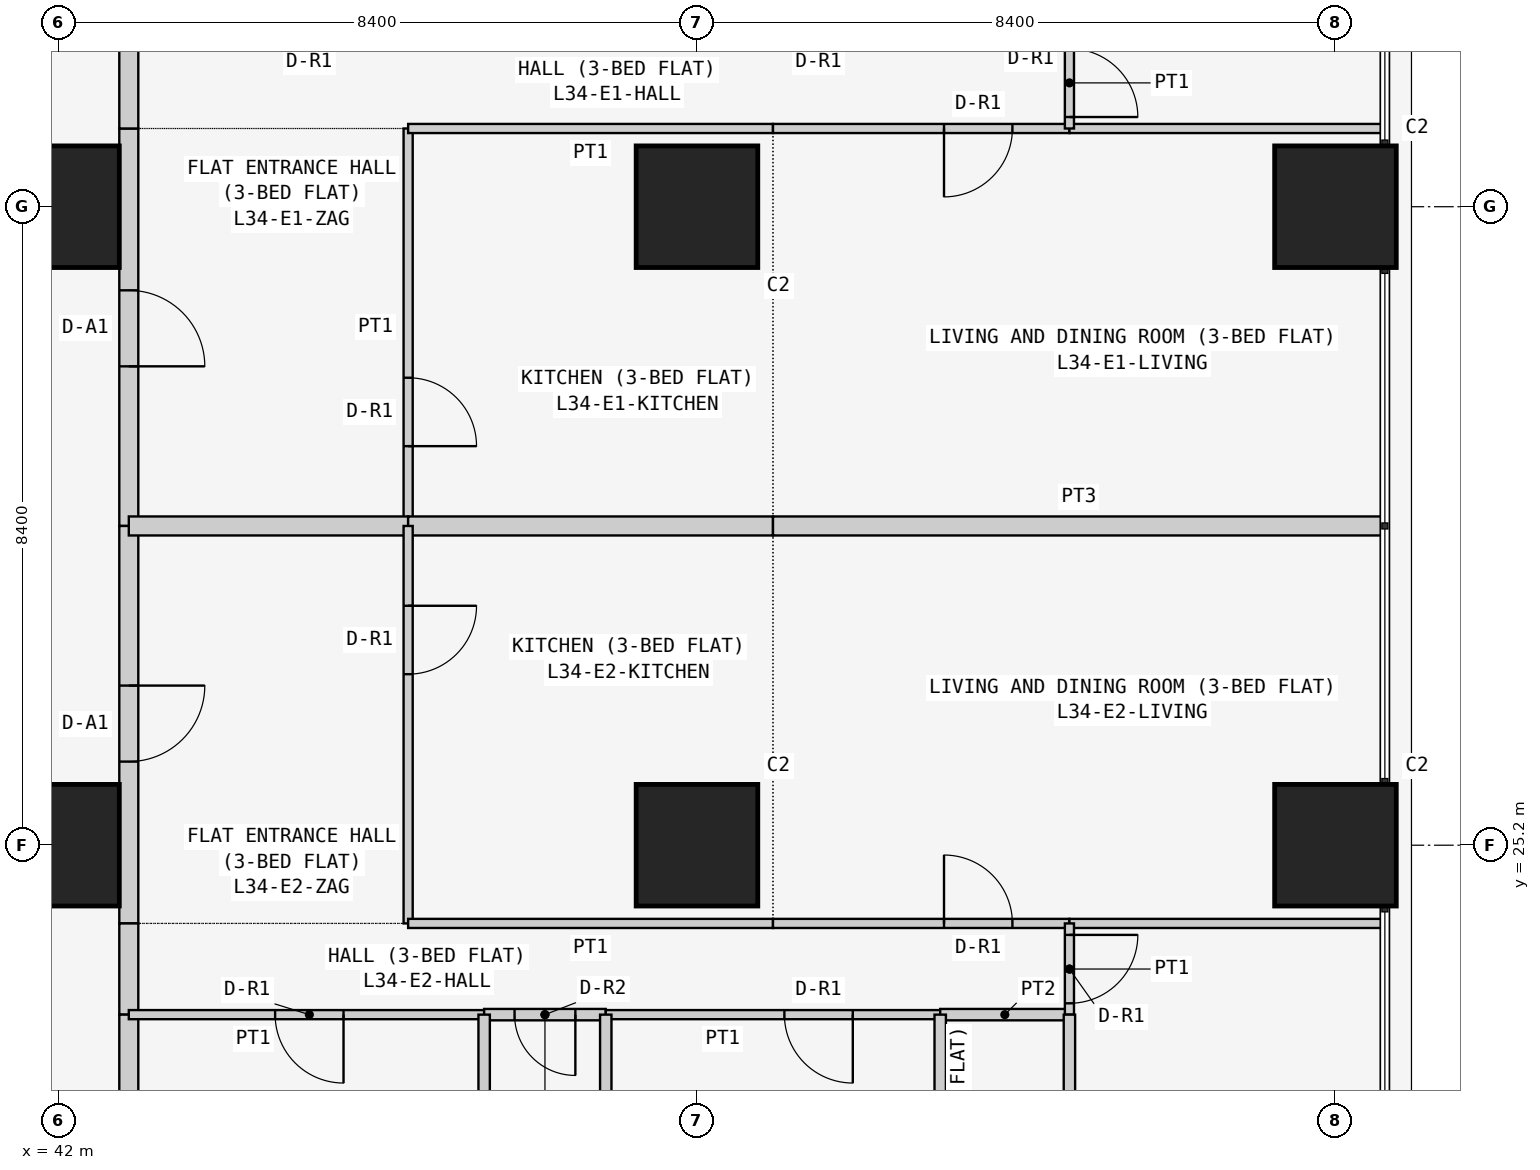
"""IFC4 building model, lengths in metres.
Left out: names, types, materials, properties, quantities, classifications, styles, units other than length and angle.
Written with IfcOpenShell. Run it as: python <this file> out.ifc"""

import sys

from ifc_helpers import new_model, si_unit, direction, frame, frame_2d, origin, origin_2d, place, context, subcontext, project, spatial, rectangle, extrude, element, fill, save


model = new_model("IFC4")
c1 = context("Model", 3, precision=1e-05, world=origin(), true_north=direction((0.0, 1.0)))
c2 = subcontext(c1, "Body", "Model", "MODEL_VIEW")
j1 = project(units=[si_unit("LENGTHUNIT", "METRE"), si_unit("PLANEANGLEUNIT", "RADIAN")], contexts=[c1])
p1 = place(None, origin())
s1 = spatial("IfcSite", under=j1, at=p1, CompositionType="ELEMENT")
p2 = place(p1, origin())
s2 = spatial("IfcBuilding", under=s1, at=p2, CompositionType="ELEMENT")
p3 = place(p2, frame((0.0, 0.0, 134.1)))
s3 = spatial("IfcBuildingStorey", under=s2, at=p3, CompositionType="ELEMENT", Elevation=134.1)
for number, where, z_axis, x_axis in (
    (1, (42.0, 25.2, 0.0), (0.0, 0.0, 1.0), (1.0, 0.0, 0.0)),
    (2, (42.0, 33.6, 0.0), (0.0, 0.0, 1.0), (1.0, 0.0, 0.0)),
    (3, (50.4, 25.2, 0.0), (0.0, 0.0, 1.0), (1.0, 0.0, 0.0)),
    (4, (50.4, 33.6, 0.0), (0.0, 0.0, 1.0), (1.0, 0.0, 0.0)),
    (5, (58.8, 25.2, 0.0), (0.0, 0.0, 1.0), (1.0, 0.0, 0.0)),
    (6, (58.8, 33.6, 0.0), (0.0, 0.0, 1.0), (1.0, 0.0, 0.0)),
):
    element("IfcColumn", number, at=place(p3, frame(where, z_axis=z_axis, x_axis=x_axis)), inside=s3, PredefinedType="COLUMN", context=c2, shape_type="SweptSolid", body=[
        extrude(rectangle(XDim=1.6, YDim=1.6, at=origin_2d()), origin(), (0.0, 0.0, 1.0), 3.6),
    ])
p4 = place(p3, frame((42.925, 34.629, 0.0), z_axis=(0.0, 0.0, 1.0), x_axis=(0.0, -1.0, 0.0)))
e7 = element("IfcWall", 7, at=p4, inside=s3, PredefinedType="PARTITIONING", context=c2, shape_type="SweptSolid", body=[
    extrude(rectangle(XDim=5.229, YDim=0.25, at=frame_2d((2.615, 0.0))), origin(), (0.0, 0.0, 1.0), 3.45),
])
p5 = place(p4, frame((2.129, 0.0, 0.0)))
e8 = element("IfcOpeningElement", 8, at=p5, cuts=e7, PredefinedType="OPENING", context=c2, shape_type="SweptSolid", body=[
    extrude(rectangle(XDim=1.0, YDim=2.1, at=frame_2d((0.5, 1.05))), frame((0.0, 0.135, 0.0), z_axis=(0.0, -1.0, 0.0), x_axis=(1.0, 0.0, 0.0)), (0.0, 0.0, 1.0), 0.27),
])
p6 = place(p3, frame((42.925, 35.829, 0.0), z_axis=(0.0, 0.0, 1.0), x_axis=(0.0, -1.0, 0.0)))
e9 = element("IfcWall", 9, at=p6, inside=s3, PredefinedType="PARTITIONING", context=c2, shape_type="SweptSolid", body=[
    extrude(rectangle(XDim=1.2, YDim=0.25, at=frame_2d((0.6, 0.0))), origin(), (0.0, 0.0, 1.0), 3.45),
])
p7 = place(p3, frame((42.925, 29.4, 0.0), z_axis=(0.0, 0.0, 1.0), x_axis=(0.0, -1.0, 0.0)))
e10 = element("IfcWall", 10, at=p7, inside=s3, PredefinedType="PARTITIONING", context=c2, shape_type="SweptSolid", body=[
    extrude(rectangle(XDim=5.229, YDim=0.25, at=frame_2d((2.615, 0.0))), origin(), (0.0, 0.0, 1.0), 3.45),
])
p8 = place(p7, frame((2.1, 0.0, 0.0)))
e11 = element("IfcOpeningElement", 11, at=p8, cuts=e10, PredefinedType="OPENING", context=c2, shape_type="SweptSolid", body=[
    extrude(rectangle(XDim=1.0, YDim=2.1, at=frame_2d((0.5, 1.05))), frame((0.0, 0.135, 0.0), z_axis=(0.0, -1.0, 0.0), x_axis=(1.0, 0.0, 0.0)), (0.0, 0.0, 1.0), 0.27),
])
p9 = place(p3, frame((42.925, 24.171, 0.0), z_axis=(0.0, 0.0, 1.0), x_axis=(0.0, -1.0, 0.0)))
e12 = element("IfcWall", 12, at=p9, inside=s3, PredefinedType="PARTITIONING", context=c2, shape_type="SweptSolid", body=[
    extrude(rectangle(XDim=1.2, YDim=0.25, at=frame_2d((0.6, 0.0))), origin(), (0.0, 0.0, 1.0), 3.45),
])
p10 = place(p3, frame((42.925, 22.971, 0.0), z_axis=(0.0, 0.0, 1.0), x_axis=(0.0, -1.0, 0.0)))
e13 = element("IfcWall", 13, at=p10, inside=s3, PredefinedType="PARTITIONING", context=c2, shape_type="SweptSolid", body=[
    extrude(rectangle(XDim=6.871, YDim=0.25, at=frame_2d((3.436, 0.0))), origin(), (0.0, 0.0, 1.0), 3.45),
])
p11 = place(p3, frame((46.6, 29.4, 0.0), z_axis=(0.0, 0.0, 1.0), x_axis=(0.0, 1.0, 0.0)))
e14 = element("IfcWall", 14, at=p11, inside=s3, PredefinedType="PARTITIONING", context=c2, shape_type="SweptSolid", body=[
    extrude(rectangle(XDim=5.229, YDim=0.12, at=frame_2d((2.615, 0.0))), origin(), (0.0, 0.0, 1.0), 3.45),
])
p12 = place(p11, frame((1.05, 0.0, 0.0)))
e15 = element("IfcOpeningElement", 15, at=p12, cuts=e14, PredefinedType="OPENING", context=c2, shape_type="SweptSolid", body=[
    extrude(rectangle(XDim=0.9, YDim=2.1, at=frame_2d((0.45, 1.05))), frame((0.0, 0.07, 0.0), z_axis=(0.0, -1.0, 0.0), x_axis=(1.0, 0.0, 0.0)), (0.0, 0.0, 1.0), 0.14),
])
p13 = place(p3, frame((42.925, 29.4, 0.0), z_axis=(0.0, 0.0, 1.0), x_axis=(1.0, 0.0, 0.0)))
e16 = element("IfcWall", 16, at=p13, inside=s3, PredefinedType="PARTITIONING", context=c2, shape_type="SweptSolid", body=[
    extrude(rectangle(XDim=3.675, YDim=0.25, at=frame_2d((1.837, 0.0))), origin(), (0.0, 0.0, 1.0), 3.45),
])
p14 = place(p3, frame((51.4, 34.629, 0.0), z_axis=(0.0, 0.0, 1.0), x_axis=(-1.0, 0.0, 0.0)))
e17 = element("IfcWall", 17, at=p14, inside=s3, PredefinedType="PARTITIONING", context=c2, shape_type="SweptSolid", body=[
    extrude(rectangle(XDim=4.8, YDim=0.12, at=frame_2d((2.4, 0.0))), origin(), (0.0, 0.0, 1.0), 3.45),
])
p15 = place(p3, frame((46.6, 29.4, 0.0), z_axis=(0.0, 0.0, 1.0), x_axis=(1.0, 0.0, 0.0)))
e18 = element("IfcWall", 18, at=p15, inside=s3, PredefinedType="PARTITIONING", context=c2, shape_type="SweptSolid", body=[
    extrude(rectangle(XDim=4.8, YDim=0.25, at=frame_2d((2.4, 0.0))), origin(), (0.0, 0.0, 1.0), 3.45),
])
p16 = place(p3, frame((55.3, 34.629, 0.0), z_axis=(0.0, 0.0, 1.0), x_axis=(-1.0, 0.0, 0.0)))
e19 = element("IfcWall", 19, at=p16, inside=s3, PredefinedType="PARTITIONING", context=c2, shape_type="SweptSolid", body=[
    extrude(rectangle(XDim=3.9, YDim=0.12, at=frame_2d((1.95, 0.0))), origin(), (0.0, 0.0, 1.0), 3.45),
])
p17 = place(p16, frame((0.75, 0.0, 0.0)))
e20 = element("IfcOpeningElement", 20, at=p17, cuts=e19, PredefinedType="OPENING", context=c2, shape_type="SweptSolid", body=[
    extrude(rectangle(XDim=0.9, YDim=2.1, at=frame_2d((0.45, 1.05))), frame((0.0, 0.07, 0.0), z_axis=(0.0, -1.0, 0.0), x_axis=(1.0, 0.0, 0.0)), (0.0, 0.0, 1.0), 0.14),
])
p18 = place(p3, frame((59.45, 34.629, 0.0), z_axis=(0.0, 0.0, 1.0), x_axis=(-1.0, 0.0, 0.0)))
e21 = element("IfcWall", 21, at=p18, inside=s3, PredefinedType="PARTITIONING", context=c2, shape_type="SweptSolid", body=[
    extrude(rectangle(XDim=4.15, YDim=0.12, at=frame_2d((2.075, 0.0))), origin(), (0.0, 0.0, 1.0), 3.45),
])
p19 = place(p3, frame((51.4, 29.4, 0.0), z_axis=(0.0, 0.0, 1.0), x_axis=(1.0, 0.0, 0.0)))
e22 = element("IfcWall", 22, at=p19, inside=s3, PredefinedType="PARTITIONING", context=c2, shape_type="SweptSolid", body=[
    extrude(rectangle(XDim=8.05, YDim=0.25, at=frame_2d((4.025, 0.0))), origin(), (0.0, 0.0, 1.0), 3.45),
])
p20 = place(p3, frame((55.3, 34.629, 0.0), z_axis=(0.0, 0.0, 1.0), x_axis=(0.0, 1.0, 0.0)))
e23 = element("IfcWall", 23, at=p20, inside=s3, PredefinedType="PARTITIONING", context=c2, shape_type="SweptSolid", body=[
    extrude(rectangle(XDim=1.2, YDim=0.12, at=frame_2d((0.6, 0.0))), origin(), (0.0, 0.0, 1.0), 3.45),
])
p21 = place(p20, frame((0.151, 0.0, 0.0)))
e24 = element("IfcOpeningElement", 24, at=p21, cuts=e23, PredefinedType="OPENING", context=c2, shape_type="SweptSolid", body=[
    extrude(rectangle(XDim=0.9, YDim=2.1, at=frame_2d((0.45, 1.05))), frame((0.0, 0.07, 0.0), z_axis=(0.0, -1.0, 0.0), x_axis=(1.0, 0.0, 0.0)), (0.0, 0.0, 1.0), 0.14),
])
p22 = place(p3, frame((46.6, 29.4, 0.0), z_axis=(0.0, 0.0, 1.0), x_axis=(0.0, -1.0, 0.0)))
e25 = element("IfcWall", 25, at=p22, inside=s3, PredefinedType="PARTITIONING", context=c2, shape_type="SweptSolid", body=[
    extrude(rectangle(XDim=5.229, YDim=0.12, at=frame_2d((2.615, 0.0))), origin(), (0.0, 0.0, 1.0), 3.45),
])
p23 = place(p22, frame((1.05, 0.0, 0.0)))
e26 = element("IfcOpeningElement", 26, at=p23, cuts=e25, PredefinedType="OPENING", context=c2, shape_type="SweptSolid", body=[
    extrude(rectangle(XDim=0.9, YDim=2.1, at=frame_2d((0.45, 1.05))), frame((0.0, 0.07, 0.0), z_axis=(0.0, -1.0, 0.0), x_axis=(1.0, 0.0, 0.0)), (0.0, 0.0, 1.0), 0.14),
])
p24 = place(p3, frame((51.4, 24.171, 0.0), z_axis=(0.0, 0.0, 1.0), x_axis=(-1.0, 0.0, 0.0)))
e27 = element("IfcWall", 27, at=p24, inside=s3, PredefinedType="PARTITIONING", context=c2, shape_type="SweptSolid", body=[
    extrude(rectangle(XDim=4.8, YDim=0.12, at=frame_2d((2.4, 0.0))), origin(), (0.0, 0.0, 1.0), 3.45),
])
p25 = place(p3, frame((55.3, 24.171, 0.0), z_axis=(0.0, 0.0, 1.0), x_axis=(-1.0, 0.0, 0.0)))
e28 = element("IfcWall", 28, at=p25, inside=s3, PredefinedType="PARTITIONING", context=c2, shape_type="SweptSolid", body=[
    extrude(rectangle(XDim=3.9, YDim=0.12, at=frame_2d((1.95, 0.0))), origin(), (0.0, 0.0, 1.0), 3.45),
])
p26 = place(p25, frame((0.75, 0.0, 0.0)))
e29 = element("IfcOpeningElement", 29, at=p26, cuts=e28, PredefinedType="OPENING", context=c2, shape_type="SweptSolid", body=[
    extrude(rectangle(XDim=0.9, YDim=2.1, at=frame_2d((0.45, 1.05))), frame((0.0, 0.07, 0.0), z_axis=(0.0, -1.0, 0.0), x_axis=(1.0, 0.0, 0.0)), (0.0, 0.0, 1.0), 0.14),
])
p27 = place(p3, frame((59.45, 24.171, 0.0), z_axis=(0.0, 0.0, 1.0), x_axis=(-1.0, 0.0, 0.0)))
e30 = element("IfcWall", 30, at=p27, inside=s3, PredefinedType="PARTITIONING", context=c2, shape_type="SweptSolid", body=[
    extrude(rectangle(XDim=4.15, YDim=0.12, at=frame_2d((2.075, 0.0))), origin(), (0.0, 0.0, 1.0), 3.45),
])
p28 = place(p3, frame((47.6, 22.971, 0.0), z_axis=(0.0, 0.0, 1.0), x_axis=(-1.0, 0.0, 0.0)))
e31 = element("IfcWall", 31, at=p28, inside=s3, PredefinedType="PARTITIONING", context=c2, shape_type="SweptSolid", body=[
    extrude(rectangle(XDim=4.675, YDim=0.12, at=frame_2d((2.337, 0.0))), origin(), (0.0, 0.0, 1.0), 3.45),
])
p29 = place(p28, frame((1.85, 0.0, 0.0)))
e32 = element("IfcOpeningElement", 32, at=p29, cuts=e31, PredefinedType="OPENING", context=c2, shape_type="SweptSolid", body=[
    extrude(rectangle(XDim=0.9, YDim=2.1, at=frame_2d((0.45, 1.05))), frame((0.0, 0.07, 0.0), z_axis=(0.0, -1.0, 0.0), x_axis=(1.0, 0.0, 0.0)), (0.0, 0.0, 1.0), 0.14),
])
p30 = place(p3, frame((49.2, 22.971, 0.0), z_axis=(0.0, 0.0, 1.0), x_axis=(-1.0, 0.0, 0.0)))
e33 = element("IfcWall", 33, at=p30, inside=s3, PredefinedType="PARTITIONING", context=c2, shape_type="SweptSolid", body=[
    extrude(rectangle(XDim=1.6, YDim=0.15, at=frame_2d((0.8, 0.0))), origin(), (0.0, 0.0, 1.0), 3.45),
])
p31 = place(p30, frame((0.4, 0.0, 0.0)))
e34 = element("IfcOpeningElement", 34, at=p31, cuts=e33, PredefinedType="OPENING", context=c2, shape_type="SweptSolid", body=[
    extrude(rectangle(XDim=0.8, YDim=2.1, at=frame_2d((0.4, 1.05))), frame((0.0, 0.085, 0.0), z_axis=(0.0, -1.0, 0.0), x_axis=(1.0, 0.0, 0.0)), (0.0, 0.0, 1.0), 0.17),
])
p32 = place(p3, frame((53.6, 22.971, 0.0), z_axis=(0.0, 0.0, 1.0), x_axis=(-1.0, 0.0, 0.0)))
e35 = element("IfcWall", 35, at=p32, inside=s3, PredefinedType="PARTITIONING", context=c2, shape_type="SweptSolid", body=[
    extrude(rectangle(XDim=4.4, YDim=0.12, at=frame_2d((2.2, 0.0))), origin(), (0.0, 0.0, 1.0), 3.45),
])
p33 = place(p32, frame((1.15, 0.0, 0.0)))
e36 = element("IfcOpeningElement", 36, at=p33, cuts=e35, PredefinedType="OPENING", context=c2, shape_type="SweptSolid", body=[
    extrude(rectangle(XDim=0.9, YDim=2.1, at=frame_2d((0.45, 1.05))), frame((0.0, 0.07, 0.0), z_axis=(0.0, -1.0, 0.0), x_axis=(1.0, 0.0, 0.0)), (0.0, 0.0, 1.0), 0.14),
])
p34 = place(p3, frame((55.3, 22.971, 0.0), z_axis=(0.0, 0.0, 1.0), x_axis=(-1.0, 0.0, 0.0)))
e37 = element("IfcWall", 37, at=p34, inside=s3, PredefinedType="PARTITIONING", context=c2, shape_type="SweptSolid", body=[
    extrude(rectangle(XDim=1.7, YDim=0.15, at=frame_2d((0.85, 0.0))), origin(), (0.0, 0.0, 1.0), 3.45),
])
p35 = place(p3, frame((55.3, 24.171, 0.0), z_axis=(0.0, 0.0, 1.0), x_axis=(0.0, -1.0, 0.0)))
e38 = element("IfcWall", 38, at=p35, inside=s3, PredefinedType="PARTITIONING", context=c2, shape_type="SweptSolid", body=[
    extrude(rectangle(XDim=1.2, YDim=0.12, at=frame_2d((0.6, 0.0))), origin(), (0.0, 0.0, 1.0), 3.45),
])
p36 = place(p35, frame((0.151, 0.0, 0.0)))
e39 = element("IfcOpeningElement", 39, at=p36, cuts=e38, PredefinedType="OPENING", context=c2, shape_type="SweptSolid", body=[
    extrude(rectangle(XDim=0.9, YDim=2.1, at=frame_2d((0.45, 1.05))), frame((0.0, 0.07, 0.0), z_axis=(0.0, -1.0, 0.0), x_axis=(1.0, 0.0, 0.0)), (0.0, 0.0, 1.0), 0.14),
])
for number, where, z_axis, x_axis in (
    (40, (47.6, 22.971, 0.0), (0.0, 0.0, 1.0), (0.0, -1.0, 0.0)),
    (41, (49.2, 22.971, 0.0), (0.0, 0.0, 1.0), (0.0, -1.0, 0.0)),
    (42, (53.6, 22.971, 0.0), (0.0, 0.0, 1.0), (0.0, -1.0, 0.0)),
):
    element("IfcWall", number, at=place(p3, frame(where, z_axis=z_axis, x_axis=x_axis)), inside=s3, PredefinedType="PARTITIONING", context=c2, shape_type="SweptSolid", body=[
        extrude(rectangle(XDim=6.871, YDim=0.15, at=frame_2d((3.436, 0.0))), origin(), (0.0, 0.0, 1.0), 3.45),
    ])
p37 = place(p3, frame((55.3, 22.971, 0.0), z_axis=(0.0, 0.0, 1.0), x_axis=(0.0, -1.0, 0.0)))
e43 = element("IfcWall", 43, at=p37, inside=s3, PredefinedType="PARTITIONING", context=c2, shape_type="SweptSolid", body=[
    extrude(rectangle(XDim=6.871, YDim=0.15, at=frame_2d((3.436, 0.0))), origin(), (0.0, 0.0, 1.0), 3.45),
])
p38 = place(p37, frame((3.171, 0.0, 0.0)))
e44 = element("IfcOpeningElement", 44, at=p38, cuts=e43, PredefinedType="OPENING", context=c2, shape_type="SweptSolid", body=[
    extrude(rectangle(XDim=0.8, YDim=2.1, at=frame_2d((0.4, 1.05))), frame((0.0, 0.085, 0.0), z_axis=(0.0, -1.0, 0.0), x_axis=(1.0, 0.0, 0.0)), (0.0, 0.0, 1.0), 0.17),
])
p39 = place(p5, origin())
e45 = element("IfcDoor", 45, at=p39, inside=s3, OperationType="SINGLE_SWING_RIGHT", PredefinedType="DOOR", context=c2, shape_type="SweptSolid", body=[
    extrude(rectangle(XDim=1.0, YDim=2.1, at=frame_2d((0.5, 1.05))), frame((0.0, 0.025, 0.0), z_axis=(0.0, -1.0, 0.0), x_axis=(1.0, 0.0, 0.0)), (0.0, 0.0, 1.0), 0.05),
])
fill(e8, e45)
p40 = place(p12, frame((0.9, 0.0, 0.0), z_axis=(0.0, 0.0, 1.0), x_axis=(-1.0, 0.0, 0.0)))
e46 = element("IfcDoor", 46, at=p40, inside=s3, OperationType="SINGLE_SWING_RIGHT", PredefinedType="DOOR", context=c2, shape_type="SweptSolid", body=[
    extrude(rectangle(XDim=0.9, YDim=2.1, at=frame_2d((0.45, 1.05))), frame((0.0, 0.025, 0.0), z_axis=(0.0, -1.0, 0.0), x_axis=(1.0, 0.0, 0.0)), (0.0, 0.0, 1.0), 0.05),
])
fill(e15, e46)
p41 = place(p17, origin())
e47 = element("IfcDoor", 47, at=p41, inside=s3, OperationType="SINGLE_SWING_RIGHT", PredefinedType="DOOR", context=c2, shape_type="SweptSolid", body=[
    extrude(rectangle(XDim=0.9, YDim=2.1, at=frame_2d((0.45, 1.05))), frame((0.0, 0.025, 0.0), z_axis=(0.0, -1.0, 0.0), x_axis=(1.0, 0.0, 0.0)), (0.0, 0.0, 1.0), 0.05),
])
fill(e20, e47)
p42 = place(p21, frame((0.9, 0.0, 0.0), z_axis=(0.0, 0.0, 1.0), x_axis=(-1.0, 0.0, 0.0)))
e48 = element("IfcDoor", 48, at=p42, inside=s3, OperationType="SINGLE_SWING_RIGHT", PredefinedType="DOOR", context=c2, shape_type="SweptSolid", body=[
    extrude(rectangle(XDim=0.9, YDim=2.1, at=frame_2d((0.45, 1.05))), frame((0.0, 0.025, 0.0), z_axis=(0.0, -1.0, 0.0), x_axis=(1.0, 0.0, 0.0)), (0.0, 0.0, 1.0), 0.05),
])
fill(e24, e48)
p43 = place(p8, origin())
e49 = element("IfcDoor", 49, at=p43, inside=s3, OperationType="SINGLE_SWING_LEFT", PredefinedType="DOOR", context=c2, shape_type="SweptSolid", body=[
    extrude(rectangle(XDim=1.0, YDim=2.1, at=frame_2d((0.5, 1.05))), frame((0.0, 0.025, 0.0), z_axis=(0.0, -1.0, 0.0), x_axis=(1.0, 0.0, 0.0)), (0.0, 0.0, 1.0), 0.05),
])
fill(e11, e49)
p44 = place(p23, origin())
e50 = element("IfcDoor", 50, at=p44, inside=s3, OperationType="SINGLE_SWING_LEFT", PredefinedType="DOOR", context=c2, shape_type="SweptSolid", body=[
    extrude(rectangle(XDim=0.9, YDim=2.1, at=frame_2d((0.45, 1.05))), frame((0.0, 0.025, 0.0), z_axis=(0.0, -1.0, 0.0), x_axis=(1.0, 0.0, 0.0)), (0.0, 0.0, 1.0), 0.05),
])
fill(e26, e50)
p45 = place(p26, frame((0.9, 0.0, 0.0), z_axis=(0.0, 0.0, 1.0), x_axis=(-1.0, 0.0, 0.0)))
e51 = element("IfcDoor", 51, at=p45, inside=s3, OperationType="SINGLE_SWING_LEFT", PredefinedType="DOOR", context=c2, shape_type="SweptSolid", body=[
    extrude(rectangle(XDim=0.9, YDim=2.1, at=frame_2d((0.45, 1.05))), frame((0.0, 0.025, 0.0), z_axis=(0.0, -1.0, 0.0), x_axis=(1.0, 0.0, 0.0)), (0.0, 0.0, 1.0), 0.05),
])
fill(e29, e51)
p46 = place(p29, origin())
e52 = element("IfcDoor", 52, at=p46, inside=s3, OperationType="SINGLE_SWING_LEFT", PredefinedType="DOOR", context=c2, shape_type="SweptSolid", body=[
    extrude(rectangle(XDim=0.9, YDim=2.1, at=frame_2d((0.45, 1.05))), frame((0.0, 0.025, 0.0), z_axis=(0.0, -1.0, 0.0), x_axis=(1.0, 0.0, 0.0)), (0.0, 0.0, 1.0), 0.05),
])
fill(e32, e52)
p47 = place(p31, origin())
e53 = element("IfcDoor", 53, at=p47, inside=s3, OperationType="SINGLE_SWING_LEFT", PredefinedType="DOOR", context=c2, shape_type="SweptSolid", body=[
    extrude(rectangle(XDim=0.8, YDim=2.1, at=frame_2d((0.4, 1.05))), frame((0.0, 0.025, 0.0), z_axis=(0.0, -1.0, 0.0), x_axis=(1.0, 0.0, 0.0)), (0.0, 0.0, 1.0), 0.05),
])
fill(e34, e53)
p48 = place(p33, origin())
e54 = element("IfcDoor", 54, at=p48, inside=s3, OperationType="SINGLE_SWING_LEFT", PredefinedType="DOOR", context=c2, shape_type="SweptSolid", body=[
    extrude(rectangle(XDim=0.9, YDim=2.1, at=frame_2d((0.45, 1.05))), frame((0.0, 0.025, 0.0), z_axis=(0.0, -1.0, 0.0), x_axis=(1.0, 0.0, 0.0)), (0.0, 0.0, 1.0), 0.05),
])
fill(e36, e54)
p49 = place(p36, origin())
e55 = element("IfcDoor", 55, at=p49, inside=s3, OperationType="SINGLE_SWING_LEFT", PredefinedType="DOOR", context=c2, shape_type="SweptSolid", body=[
    extrude(rectangle(XDim=0.9, YDim=2.1, at=frame_2d((0.45, 1.05))), frame((0.0, 0.025, 0.0), z_axis=(0.0, -1.0, 0.0), x_axis=(1.0, 0.0, 0.0)), (0.0, 0.0, 1.0), 0.05),
])
fill(e39, e55)
save(model, sys.argv[1])
